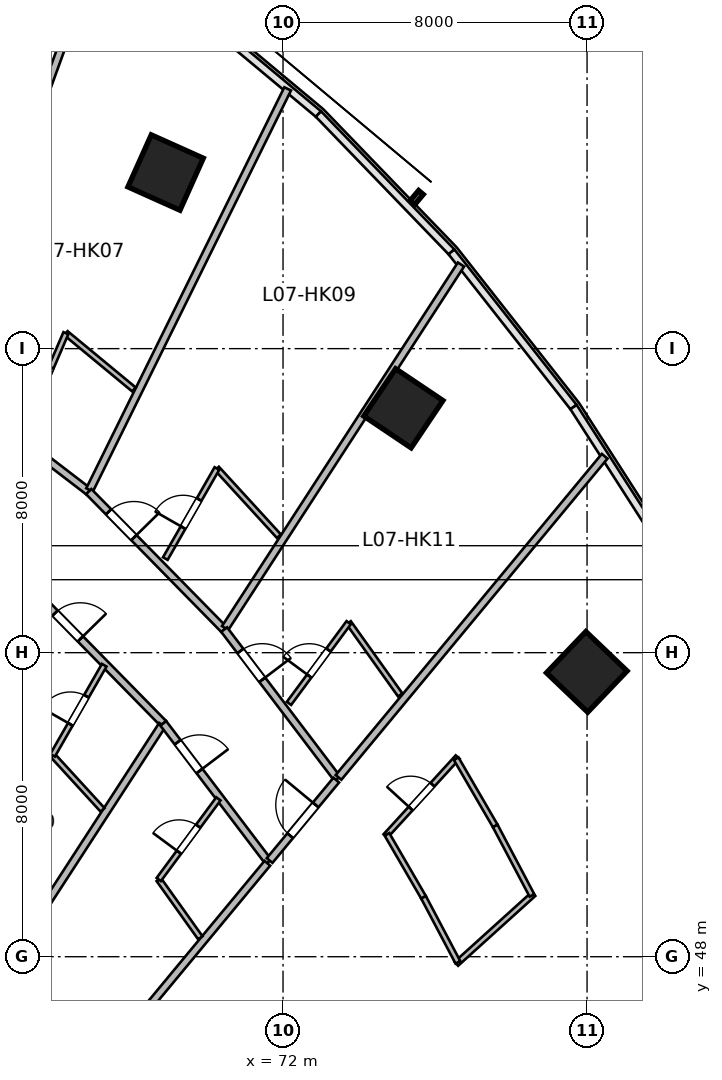
"""IFC4 building model, lengths in metres.
Left out: names, types, materials, properties, quantities, classifications, styles, units other than length and angle.
Written with IfcOpenShell. Run it as: python <this file> out.ifc"""

import sys

from ifc_helpers import new_model, si_unit, direction, frame, frame_2d, origin, origin_2d, place, context, subcontext, project, spatial, rectangle, extrude, source, transform, mapped, element, fill, save


model = new_model("IFC4")
c1 = context("Model", 3, precision=1e-05, world=origin(), true_north=direction((0.0, 1.0)))
c2 = subcontext(c1, "Body", "Model", "MODEL_VIEW")
j1 = project(units=[si_unit("LENGTHUNIT", "METRE"), si_unit("PLANEANGLEUNIT", "RADIAN")], contexts=[c1])
p1 = place(None, origin())
s1 = spatial("IfcSite", under=j1, at=p1, CompositionType="ELEMENT")
p2 = place(p1, origin())
s2 = spatial("IfcBuilding", under=s1, at=p2, CompositionType="ELEMENT")
p3 = place(p2, frame((0.0, 0.0, 39.0)))
s3 = spatial("IfcBuildingStorey", under=s2, at=p3, CompositionType="ELEMENT", Elevation=39.0)
m1 = source(origin(), c2, "Body", "SweptSolid", [
    extrude(rectangle(XDim=1.5, YDim=1.5, at=origin_2d()), origin(), (0.0, 0.0, 1.0), 3.6),
])
for number, where, z_axis, x_axis in (
    (1, (68.91, 68.633, 0.0), (0.0, 0.0, 1.0), (0.409, 0.912, 0.0)),
    (2, (75.167, 62.43, 0.0), (0.0, 0.0, 1.0), (0.558, 0.83, 0.0)),
    (3, (79.993, 55.494, 0.0), (0.0, 0.0, 1.0), (0.691, 0.723, 0.0)),
):
    element("IfcColumn", number, at=place(p3, frame(where, z_axis=z_axis, x_axis=x_axis)), inside=s3, PredefinedType="COLUMN", context=c2, shape_type="MappedRepresentation", body=[
        mapped(m1, transform((0.0, 0.0, 0.0), scale=1.0)),
    ])
m2 = source(origin(), c2, "Body", "SweptSolid", [
    extrude(rectangle(XDim=4.895, YDim=0.195, at=frame_2d((2.447, 0.0))), origin(), (0.0, 0.0, 1.0), 3.36),
])
p4 = place(p3, frame((63.001, 63.214, 0.0), z_axis=(0.0, 0.0, 1.0), x_axis=(0.793896075849, -0.608053468661, 0.0)))
e4 = element("IfcWall", 4, at=p4, inside=s3, PredefinedType="PARTITIONING", context=c2, shape_type="MappedRepresentation", body=[
    mapped(m2, transform((0.0, 0.0, 0.0), scale=1.0)),
])
p5 = place(p4, frame((0.7, 0.0, 0.0)))
e5 = element("IfcOpeningElement", 5, at=p5, cuts=e4, PredefinedType="OPENING", context=c2, shape_type="SweptSolid", body=[
    extrude(rectangle(XDim=0.95, YDim=2.15, at=frame_2d((0.475, 1.075))), frame((0.0, 0.107, 0.0), z_axis=(0.0, -1.0, 0.0), x_axis=(1.0, 0.0, 0.0)), (0.0, 0.0, 1.0), 0.215),
])
m3 = source(origin(), c2, "Body", "SweptSolid", [
    extrude(rectangle(XDim=12.088, YDim=0.195, at=frame_2d((6.044, 0.0))), origin(), (0.0, 0.0, 1.0), 3.36),
])
p6 = place(p3, frame((63.019, 63.262, 0.0), z_axis=(0.0, 0.0, 1.0), x_axis=(0.34203007529, 0.939689005787, 0.0)))
e6 = element("IfcWall", 6, at=p6, inside=s3, PredefinedType="PARTITIONING", context=c2, shape_type="MappedRepresentation", body=[
    mapped(m3, transform((0.0, 0.0, 0.0), scale=1.0)),
])
m4 = source(origin(), c2, "Body", "SweptSolid", [
    extrude(rectangle(XDim=11.77, YDim=0.195, at=frame_2d((5.885, 0.0))), origin(), (0.0, 0.0, 1.0), 3.36),
])
p7 = place(p3, frame((66.909, 60.282, 0.0), z_axis=(0.0, 0.0, 1.0), x_axis=(0.44286060326, 0.896590478468, 0.0)))
e7 = element("IfcWall", 7, at=p7, inside=s3, PredefinedType="PARTITIONING", context=c2, shape_type="MappedRepresentation", body=[
    mapped(m4, transform((0.0, 0.0, 0.0), scale=1.0)),
])
m5 = source(origin(), c2, "Body", "SweptSolid", [
    extrude(rectangle(XDim=2.324, YDim=0.14, at=frame_2d((1.162, 0.0))), origin(), (0.0, 0.0, 1.0), 3.36),
])
p8 = place(p3, frame((66.286, 64.407, 0.0), z_axis=(0.0, 0.0, 1.0), x_axis=(0.770746444956, -0.637141991701, 0.0)))
e8 = element("IfcWall", 8, at=p8, inside=s3, PredefinedType="PARTITIONING", context=c2, shape_type="MappedRepresentation", body=[
    mapped(m5, transform((0.0, 0.0, 0.0), scale=1.0)),
])
m6 = source(origin(), c2, "Body", "SweptSolid", [
    extrude(rectangle(XDim=2.818, YDim=0.14, at=frame_2d((1.409, 0.0))), origin(), (0.0, 0.0, 1.0), 3.36),
])
p9 = place(p3, frame((65.17, 61.819, 0.0), z_axis=(0.0, 0.0, 1.0), x_axis=(0.395894859341, 0.918295845764, 0.0)))
e9 = element("IfcWall", 9, at=p9, inside=s3, PredefinedType="PARTITIONING", context=c2, shape_type="MappedRepresentation", body=[
    mapped(m6, transform((0.0, 0.0, 0.0), scale=1.0)),
])
p10 = place(p9, frame((0.984, 0.0, 0.0)))
e10 = element("IfcOpeningElement", 10, at=p10, cuts=e9, PredefinedType="OPENING", context=c2, shape_type="SweptSolid", body=[
    extrude(rectangle(XDim=0.85, YDim=2.05, at=frame_2d((0.425, 1.025))), frame((0.0, 0.08, 0.0), z_axis=(0.0, -1.0, 0.0), x_axis=(1.0, 0.0, 0.0)), (0.0, 0.0, 1.0), 0.16),
])
m7 = source(origin(), c2, "Body", "SweptSolid", [
    extrude(rectangle(XDim=5.087, YDim=0.195, at=frame_2d((2.543, 0.0))), origin(), (0.0, 0.0, 1.0), 3.36),
])
p11 = place(p3, frame((66.887, 60.238, 0.0), z_axis=(0.0, 0.0, 1.0), x_axis=(0.700428330775, -0.7137227427, 0.0)))
e11 = element("IfcWall", 11, at=p11, inside=s3, PredefinedType="PARTITIONING", context=c2, shape_type="MappedRepresentation", body=[
    mapped(m7, transform((0.0, 0.0, 0.0), scale=1.0)),
])
p12 = place(p11, frame((0.746, 0.0, 0.0)))
e12 = element("IfcOpeningElement", 12, at=p12, cuts=e11, PredefinedType="OPENING", context=c2, shape_type="SweptSolid", body=[
    extrude(rectangle(XDim=0.95, YDim=2.15, at=frame_2d((0.475, 1.075))), frame((0.0, 0.107, 0.0), z_axis=(0.0, -1.0, 0.0), x_axis=(1.0, 0.0, 0.0)), (0.0, 0.0, 1.0), 0.215),
])
m8 = source(origin(), c2, "Body", "SweptSolid", [
    extrude(rectangle(XDim=11.403, YDim=0.195, at=frame_2d((5.701, 0.0))), origin(), (0.0, 0.0, 1.0), 3.36),
])
p13 = place(p3, frame((70.477, 56.647, 0.0), z_axis=(0.0, 0.0, 1.0), x_axis=(0.544246090008, 0.838925618581, 0.0)))
e13 = element("IfcWall", 13, at=p13, inside=s3, PredefinedType="PARTITIONING", context=c2, shape_type="MappedRepresentation", body=[
    mapped(m8, transform((0.0, 0.0, 0.0), scale=1.0)),
])
m9 = source(origin(), c2, "Body", "SweptSolid", [
    extrude(rectangle(XDim=2.416, YDim=0.14, at=frame_2d((1.208, 0.0))), origin(), (0.0, 0.0, 1.0), 3.36),
])
p14 = place(p3, frame((70.26, 60.846, 0.0), z_axis=(0.0, 0.0, 1.0), x_axis=(0.675399637907, -0.737451916476, 0.0)))
e14 = element("IfcWall", 14, at=p14, inside=s3, PredefinedType="PARTITIONING", context=c2, shape_type="MappedRepresentation", body=[
    mapped(m9, transform((0.0, 0.0, 0.0), scale=1.0)),
])
m10 = source(origin(), c2, "Body", "SweptSolid", [
    extrude(rectangle(XDim=2.732, YDim=0.14, at=frame_2d((1.366, 0.0))), origin(), (0.0, 0.0, 1.0), 3.36),
])
p15 = place(p3, frame((68.902, 58.476, 0.0), z_axis=(0.0, 0.0, 1.0), x_axis=(0.497254966372, 0.867604459658, 0.0)))
e15 = element("IfcWall", 15, at=p15, inside=s3, PredefinedType="PARTITIONING", context=c2, shape_type="MappedRepresentation", body=[
    mapped(m10, transform((0.0, 0.0, 0.0), scale=1.0)),
])
p16 = place(p15, frame((0.941, 0.0, 0.0)))
e16 = element("IfcOpeningElement", 16, at=p16, cuts=e15, PredefinedType="OPENING", context=c2, shape_type="SweptSolid", body=[
    extrude(rectangle(XDim=0.85, YDim=2.05, at=frame_2d((0.425, 1.025))), frame((0.0, 0.08, 0.0), z_axis=(0.0, -1.0, 0.0), x_axis=(1.0, 0.0, 0.0)), (0.0, 0.0, 1.0), 0.16),
])
m11 = source(origin(), c2, "Body", "SweptSolid", [
    extrude(rectangle(XDim=4.724, YDim=0.195, at=frame_2d((2.362, 0.0))), origin(), (0.0, 0.0, 1.0), 3.36),
])
p17 = place(p3, frame((65.541, 57.511, 0.0), z_axis=(0.0, 0.0, 1.0), x_axis=(0.700435057457, -0.713716141253, 0.0)))
e17 = element("IfcWall", 17, at=p17, inside=s3, PredefinedType="PARTITIONING", context=c2, shape_type="MappedRepresentation", body=[
    mapped(m11, transform((0.0, 0.0, 0.0), scale=1.0)),
])
p18 = place(p17, frame((0.659, 0.0, 0.0)))
e18 = element("IfcOpeningElement", 18, at=p18, cuts=e17, PredefinedType="OPENING", context=c2, shape_type="SweptSolid", body=[
    extrude(rectangle(XDim=0.95, YDim=2.15, at=frame_2d((0.475, 1.075))), frame((0.0, 0.107, 0.0), z_axis=(0.0, -1.0, 0.0), x_axis=(1.0, 0.0, 0.0)), (0.0, 0.0, 1.0), 0.215),
])
m12 = source(origin(), c2, "Body", "SweptSolid", [
    extrude(rectangle(XDim=11.429, YDim=0.195, at=frame_2d((5.714, 0.0))), origin(), (0.0, 0.0, 1.0), 3.36),
])
p19 = place(p3, frame((62.604, 44.511, 0.0), z_axis=(0.0, 0.0, 1.0), x_axis=(0.544215487077, 0.838945471187, 0.0)))
e19 = element("IfcWall", 19, at=p19, inside=s3, PredefinedType="PARTITIONING", context=c2, shape_type="MappedRepresentation", body=[
    mapped(m12, transform((0.0, 0.0, 0.0), scale=1.0)),
])
m13 = source(origin(), c2, "Body", "SweptSolid", [
    extrude(rectangle(XDim=1.947, YDim=0.14, at=frame_2d((0.973, 0.0))), origin(), (0.0, 0.0, 1.0), 2.803),
])
p20 = place(p3, frame((65.936, 53.3, 0.0), z_axis=(0.0, 0.0, 1.0), x_axis=(0.675383794012, -0.737466426888, 0.0)))
e20 = element("IfcWall", 20, at=p20, inside=s3, PredefinedType="PARTITIONING", context=c2, shape_type="MappedRepresentation", body=[
    mapped(m13, transform((0.0, 0.0, 0.0), scale=1.0)),
])
m14 = source(origin(), c2, "Body", "SweptSolid", [
    extrude(rectangle(XDim=2.731, YDim=0.14, at=frame_2d((1.366, 0.0))), origin(), (0.0, 0.0, 1.0), 3.36),
])
p21 = place(p3, frame((65.936, 53.3, 0.0), z_axis=(0.0, 0.0, 1.0), x_axis=(0.497120404056, 0.867681568244, 0.0)))
e21 = element("IfcWall", 21, at=p21, inside=s3, PredefinedType="PARTITIONING", context=c2, shape_type="MappedRepresentation", body=[
    mapped(m14, transform((0.0, 0.0, 0.0), scale=1.0)),
])
p22 = place(p21, frame((0.941, 0.0, 0.0)))
e22 = element("IfcOpeningElement", 22, at=p22, cuts=e21, PredefinedType="OPENING", context=c2, shape_type="SweptSolid", body=[
    extrude(rectangle(XDim=0.85, YDim=2.05, at=frame_2d((0.425, 1.025))), frame((0.0, 0.08, 0.0), z_axis=(0.0, -1.0, 0.0), x_axis=(1.0, 0.0, 0.0)), (0.0, 0.0, 1.0), 0.16),
])
m15 = source(origin(), c2, "Body", "SweptSolid", [
    extrude(rectangle(XDim=4.928, YDim=0.195, at=frame_2d((2.464, 0.0))), origin(), (0.0, 0.0, 1.0), 3.36),
])
p23 = place(p3, frame((70.45, 56.607, 0.0), z_axis=(0.0, 0.0, 1.0), x_axis=(0.604793043708, -0.796382680803, 0.0)))
e23 = element("IfcWall", 23, at=p23, inside=s3, PredefinedType="PARTITIONING", context=c2, shape_type="MappedRepresentation", body=[
    mapped(m15, transform((0.0, 0.0, 0.0), scale=1.0)),
])
p24 = place(p23, frame((0.708, 0.0, 0.0)))
e24 = element("IfcOpeningElement", 24, at=p24, cuts=e23, PredefinedType="OPENING", context=c2, shape_type="SweptSolid", body=[
    extrude(rectangle(XDim=0.95, YDim=2.15, at=frame_2d((0.475, 1.075))), frame((0.0, 0.107, 0.0), z_axis=(0.0, -1.0, 0.0), x_axis=(1.0, 0.0, 0.0)), (0.0, 0.0, 1.0), 0.215),
])
m16 = source(origin(), c2, "Body", "SweptSolid", [
    extrude(rectangle(XDim=10.975, YDim=0.195, at=frame_2d((5.487, 0.0))), origin(), (0.0, 0.0, 1.0), 3.36),
])
p25 = place(p3, frame((73.46, 52.719, 0.0), z_axis=(0.0, 0.0, 1.0), x_axis=(0.638125265812, 0.769932558821, 0.0)))
e25 = element("IfcWall", 25, at=p25, inside=s3, PredefinedType="PARTITIONING", context=c2, shape_type="MappedRepresentation", body=[
    mapped(m16, transform((0.0, 0.0, 0.0), scale=1.0)),
])
m17 = source(origin(), c2, "Body", "SweptSolid", [
    extrude(rectangle(XDim=2.337, YDim=0.14, at=frame_2d((1.169, 0.0))), origin(), (0.0, 0.0, 1.0), 3.36),
])
p26 = place(p3, frame((73.727, 56.789, 0.0), z_axis=(0.0, 0.0, 1.0), x_axis=(0.580862665959, -0.814001574504, 0.0)))
e26 = element("IfcWall", 26, at=p26, inside=s3, PredefinedType="PARTITIONING", context=c2, shape_type="MappedRepresentation", body=[
    mapped(m17, transform((0.0, 0.0, 0.0), scale=1.0)),
])
m18 = source(origin(), c2, "Body", "SweptSolid", [
    extrude(rectangle(XDim=2.64, YDim=0.14, at=frame_2d((1.32, 0.0))), origin(), (0.0, 0.0, 1.0), 3.36),
])
p27 = place(p3, frame((72.157, 54.666, 0.0), z_axis=(0.0, 0.0, 1.0), x_axis=(0.594630255283, 0.803999290735, 0.0)))
e27 = element("IfcWall", 27, at=p27, inside=s3, PredefinedType="PARTITIONING", context=c2, shape_type="MappedRepresentation", body=[
    mapped(m18, transform((0.0, 0.0, 0.0), scale=1.0)),
])
p28 = place(p27, frame((0.895, 0.0, 0.0)))
e28 = element("IfcOpeningElement", 28, at=p28, cuts=e27, PredefinedType="OPENING", context=c2, shape_type="SweptSolid", body=[
    extrude(rectangle(XDim=0.85, YDim=2.05, at=frame_2d((0.425, 1.025))), frame((0.0, 0.08, 0.0), z_axis=(0.0, -1.0, 0.0), x_axis=(1.0, 0.0, 0.0)), (0.0, 0.0, 1.0), 0.16),
])
m19 = source(origin(), c2, "Body", "SweptSolid", [
    extrude(rectangle(XDim=4.576, YDim=0.195, at=frame_2d((2.288, 0.0))), origin(), (0.0, 0.0, 1.0), 3.36),
])
p29 = place(p3, frame((68.85, 54.139, 0.0), z_axis=(0.0, 0.0, 1.0), x_axis=(0.604795096156, -0.796381122118, 0.0)))
e29 = element("IfcWall", 29, at=p29, inside=s3, PredefinedType="PARTITIONING", context=c2, shape_type="MappedRepresentation", body=[
    mapped(m19, transform((0.0, 0.0, 0.0), scale=1.0)),
])
p30 = place(p29, frame((0.623, 0.0, 0.0)))
e30 = element("IfcOpeningElement", 30, at=p30, cuts=e29, PredefinedType="OPENING", context=c2, shape_type="SweptSolid", body=[
    extrude(rectangle(XDim=0.95, YDim=2.15, at=frame_2d((0.475, 1.075))), frame((0.0, 0.107, 0.0), z_axis=(0.0, -1.0, 0.0), x_axis=(1.0, 0.0, 0.0)), (0.0, 0.0, 1.0), 0.215),
])
m20 = source(origin(), c2, "Body", "SweptSolid", [
    extrude(rectangle(XDim=11.053, YDim=0.195, at=frame_2d((5.527, 0.0))), origin(), (0.0, 0.0, 1.0), 3.36),
])
p31 = place(p3, frame((64.534, 41.949, 0.0), z_axis=(0.0, 0.0, 1.0), x_axis=(0.638131235571, 0.769927611005, 0.0)))
e31 = element("IfcWall", 31, at=p31, inside=s3, PredefinedType="PARTITIONING", context=c2, shape_type="MappedRepresentation", body=[
    mapped(m20, transform((0.0, 0.0, 0.0), scale=1.0)),
])
m21 = source(origin(), c2, "Body", "SweptSolid", [
    extrude(rectangle(XDim=1.884, YDim=0.14, at=frame_2d((0.942, 0.0))), origin(), (0.0, 0.0, 1.0), 2.803),
])
p32 = place(p3, frame((68.729, 50.031, 0.0), z_axis=(0.0, 0.0, 1.0), x_axis=(0.580833492897, -0.814022391295, 0.0)))
e32 = element("IfcWall", 32, at=p32, inside=s3, PredefinedType="PARTITIONING", context=c2, shape_type="MappedRepresentation", body=[
    mapped(m21, transform((0.0, 0.0, 0.0), scale=1.0)),
])
p33 = place(p3, frame((68.729, 50.031, 0.0), z_axis=(0.0, 0.0, 1.0), x_axis=(0.594674469522, 0.803966588422, 0.0)))
e33 = element("IfcWall", 33, at=p33, inside=s3, PredefinedType="PARTITIONING", context=c2, shape_type="MappedRepresentation", body=[
    mapped(m18, transform((0.0, 0.0, 0.0), scale=1.0)),
])
p34 = place(p33, frame((0.895, 0.0, 0.0)))
e34 = element("IfcOpeningElement", 34, at=p34, cuts=e33, PredefinedType="OPENING", context=c2, shape_type="SweptSolid", body=[
    extrude(rectangle(XDim=0.85, YDim=2.05, at=frame_2d((0.425, 1.025))), frame((0.0, 0.08, 0.0), z_axis=(0.0, -1.0, 0.0), x_axis=(1.0, 0.0, 0.0)), (0.0, 0.0, 1.0), 0.16),
])
m22 = source(origin(), c2, "Body", "SweptSolid", [
    extrude(rectangle(XDim=2.748, YDim=0.195, at=frame_2d((1.374, 0.0))), origin(), (0.0, 0.0, 1.0), 3.36),
])
p35 = place(p3, frame((71.647, 50.531, 0.0), z_axis=(0.0, 0.0, 1.0), x_axis=(0.638111168284, 0.769944242729, 0.0)))
e35 = element("IfcWall", 35, at=p35, inside=s3, PredefinedType="PARTITIONING", context=c2, shape_type="MappedRepresentation", body=[
    mapped(m22, transform((0.0, 0.0, 0.0), scale=1.0)),
])
p36 = place(p35, frame((0.849, 0.0, 0.0)))
e36 = element("IfcOpeningElement", 36, at=p36, cuts=e35, PredefinedType="OPENING", context=c2, shape_type="SweptSolid", body=[
    extrude(rectangle(XDim=1.05, YDim=2.15, at=frame_2d((0.525, 1.075))), frame((0.0, 0.107, 0.0), z_axis=(0.0, -1.0, 0.0), x_axis=(1.0, 0.0, 0.0)), (0.0, 0.0, 1.0), 0.215),
])
m23 = source(origin(), c2, "Body", "SweptSolid", [
    extrude(rectangle(XDim=2.812, YDim=0.14, at=frame_2d((1.406, 0.0))), origin(), (0.0, 0.0, 1.0), 3.36),
])
p37 = place(p3, frame((74.697, 51.177, 0.0), z_axis=(0.0, 0.0, 1.0), x_axis=(0.675119025852, 0.737708818527, 0.0)))
e37 = element("IfcWall", 37, at=p37, inside=s3, PredefinedType="PARTITIONING", context=c2, shape_type="MappedRepresentation", body=[
    mapped(m23, transform((0.0, 0.0, 0.0), scale=1.0)),
])
p38 = place(p37, frame((0.981, 0.0, 0.0)))
e38 = element("IfcOpeningElement", 38, at=p38, cuts=e37, PredefinedType="OPENING", context=c2, shape_type="SweptSolid", body=[
    extrude(rectangle(XDim=0.85, YDim=2.05, at=frame_2d((0.425, 1.025))), frame((0.0, 0.08, 0.0), z_axis=(0.0, -1.0, 0.0), x_axis=(1.0, 0.0, 0.0)), (0.0, 0.0, 1.0), 0.16),
])
m24 = source(origin(), c2, "Body", "SweptSolid", [
    extrude(rectangle(XDim=2.738, YDim=0.14, at=frame_2d((1.369, 0.0))), origin(), (0.0, 0.0, 1.0), 3.36),
])
p39 = place(p3, frame((76.56, 47.814, 0.0), z_axis=(0.0, 0.0, 1.0), x_axis=(0.741873676582, 0.670539669218, 0.0)))
e39 = element("IfcWall", 39, at=p39, inside=s3, PredefinedType="PARTITIONING", context=c2, shape_type="MappedRepresentation", body=[
    mapped(m24, transform((0.0, 0.0, 0.0), scale=1.0)),
])
m25 = source(origin(), c2, "Body", "SweptSolid", [
    extrude(rectangle(XDim=1.914, YDim=0.14, at=frame_2d((0.957, 0.0))), origin(), (0.0, 0.0, 1.0), 3.36),
])
p40 = place(p3, frame((74.736, 51.219, 0.0), z_axis=(0.0, 0.0, 1.0), x_axis=(0.502347790612, -0.864665656347, 0.0)))
e40 = element("IfcWall", 40, at=p40, inside=s3, PredefinedType="PARTITIONING", context=c2, shape_type="MappedRepresentation", body=[
    mapped(m25, transform((0.0, 0.0, 0.0), scale=1.0)),
])
m26 = source(origin(), c2, "Body", "SweptSolid", [
    extrude(rectangle(XDim=2.045, YDim=0.14, at=frame_2d((1.022, 0.0))), origin(), (0.0, 0.0, 1.0), 3.36),
])
p41 = place(p3, frame((76.557, 53.209, 0.0), z_axis=(0.0, 0.0, 1.0), x_axis=(0.5023112139, -0.864686905411, 0.0)))
e41 = element("IfcWall", 41, at=p41, inside=s3, PredefinedType="PARTITIONING", context=c2, shape_type="MappedRepresentation", body=[
    mapped(m26, transform((0.0, 0.0, 0.0), scale=1.0)),
])
m27 = source(origin(), c2, "Body", "SweptSolid", [
    extrude(rectangle(XDim=1.936, YDim=0.14, at=frame_2d((0.968, 0.0))), origin(), (0.0, 0.0, 1.0), 3.36),
])
p42 = place(p3, frame((75.697, 49.563, 0.0), z_axis=(0.0, 0.0, 1.0), x_axis=(0.467174971862, -0.884164886017, 0.0)))
e42 = element("IfcWall", 42, at=p42, inside=s3, PredefinedType="PARTITIONING", context=c2, shape_type="MappedRepresentation", body=[
    mapped(m27, transform((0.0, 0.0, 0.0), scale=1.0)),
])
m28 = source(origin(), c2, "Body", "SweptSolid", [
    extrude(rectangle(XDim=2.068, YDim=0.14, at=frame_2d((1.034, 0.0))), origin(), (0.0, 0.0, 1.0), 3.36),
])
p43 = place(p3, frame((77.584, 51.441, 0.0), z_axis=(0.0, 0.0, 1.0), x_axis=(0.467215057643, -0.884143704333, 0.0)))
e43 = element("IfcWall", 43, at=p43, inside=s3, PredefinedType="PARTITIONING", context=c2, shape_type="MappedRepresentation", body=[
    mapped(m28, transform((0.0, 0.0, 0.0), scale=1.0)),
])
m29 = source(origin(), c2, "Body", "SweptSolid", [
    extrude(rectangle(XDim=0.95, YDim=2.15, at=frame_2d((0.475, 1.075))), frame((0.0, 0.025, 0.0), z_axis=(0.0, -1.0, 0.0), x_axis=(1.0, 0.0, 0.0)), (0.0, 0.0, 1.0), 0.05),
])
p44 = place(p12, origin())
e44 = element("IfcDoor", 44, at=p44, inside=s3, OperationType="SINGLE_SWING_RIGHT", PredefinedType="DOOR", context=c2, shape_type="MappedRepresentation", body=[
    mapped(m29, transform((0.0, 0.0, 0.0), scale=1.0)),
])
fill(e12, e44)
m30 = source(origin(), c2, "Body", "SweptSolid", [
    extrude(rectangle(XDim=0.85, YDim=2.05, at=frame_2d((0.425, 1.025))), frame((0.0, 0.025, 0.0), z_axis=(0.0, -1.0, 0.0), x_axis=(1.0, 0.0, 0.0)), (0.0, 0.0, 1.0), 0.05),
])
p45 = place(p16, origin())
e45 = element("IfcDoor", 45, at=p45, inside=s3, OperationType="SINGLE_SWING_LEFT", PredefinedType="DOOR", context=c2, shape_type="MappedRepresentation", body=[
    mapped(m30, transform((0.0, 0.0, 0.0), scale=1.0)),
])
fill(e16, e45)
p46 = place(p18, origin())
e46 = element("IfcDoor", 46, at=p46, inside=s3, OperationType="SINGLE_SWING_RIGHT", PredefinedType="DOOR", context=c2, shape_type="MappedRepresentation", body=[
    mapped(m29, transform((0.0, 0.0, 0.0), scale=1.0)),
])
fill(e18, e46)
p47 = place(p22, origin())
e47 = element("IfcDoor", 47, at=p47, inside=s3, OperationType="SINGLE_SWING_LEFT", PredefinedType="DOOR", context=c2, shape_type="MappedRepresentation", body=[
    mapped(m30, transform((0.0, 0.0, 0.0), scale=1.0)),
])
fill(e22, e47)
p48 = place(p24, origin())
e48 = element("IfcDoor", 48, at=p48, inside=s3, OperationType="SINGLE_SWING_RIGHT", PredefinedType="DOOR", context=c2, shape_type="MappedRepresentation", body=[
    mapped(m29, transform((0.0, 0.0, 0.0), scale=1.0)),
])
fill(e24, e48)
p49 = place(p28, origin())
e49 = element("IfcDoor", 49, at=p49, inside=s3, OperationType="SINGLE_SWING_LEFT", PredefinedType="DOOR", context=c2, shape_type="MappedRepresentation", body=[
    mapped(m30, transform((0.0, 0.0, 0.0), scale=1.0)),
])
fill(e28, e49)
p50 = place(p30, origin())
e50 = element("IfcDoor", 50, at=p50, inside=s3, OperationType="SINGLE_SWING_RIGHT", PredefinedType="DOOR", context=c2, shape_type="MappedRepresentation", body=[
    mapped(m29, transform((0.0, 0.0, 0.0), scale=1.0)),
])
fill(e30, e50)
p51 = place(p34, origin())
e51 = element("IfcDoor", 51, at=p51, inside=s3, OperationType="SINGLE_SWING_LEFT", PredefinedType="DOOR", context=c2, shape_type="MappedRepresentation", body=[
    mapped(m30, transform((0.0, 0.0, 0.0), scale=1.0)),
])
fill(e34, e51)
m31 = source(origin(), c2, "Body", "SweptSolid", [
    extrude(rectangle(XDim=1.05, YDim=2.15, at=frame_2d((0.525, 1.075))), frame((0.0, 0.025, 0.0), z_axis=(0.0, -1.0, 0.0), x_axis=(1.0, 0.0, 0.0)), (0.0, 0.0, 1.0), 0.05),
])
p52 = place(p36, origin())
e52 = element("IfcDoor", 52, at=p52, inside=s3, OperationType="SINGLE_SWING_RIGHT", PredefinedType="DOOR", context=c2, shape_type="MappedRepresentation", body=[
    mapped(m31, transform((0.0, 0.0, 0.0), scale=1.0)),
])
fill(e36, e52)
p53 = place(p38, origin())
e53 = element("IfcDoor", 53, at=p53, inside=s3, OperationType="SINGLE_SWING_LEFT", PredefinedType="DOOR", context=c2, shape_type="MappedRepresentation", body=[
    mapped(m30, transform((0.0, 0.0, 0.0), scale=1.0)),
])
fill(e38, e53)
save(model, sys.argv[1])
